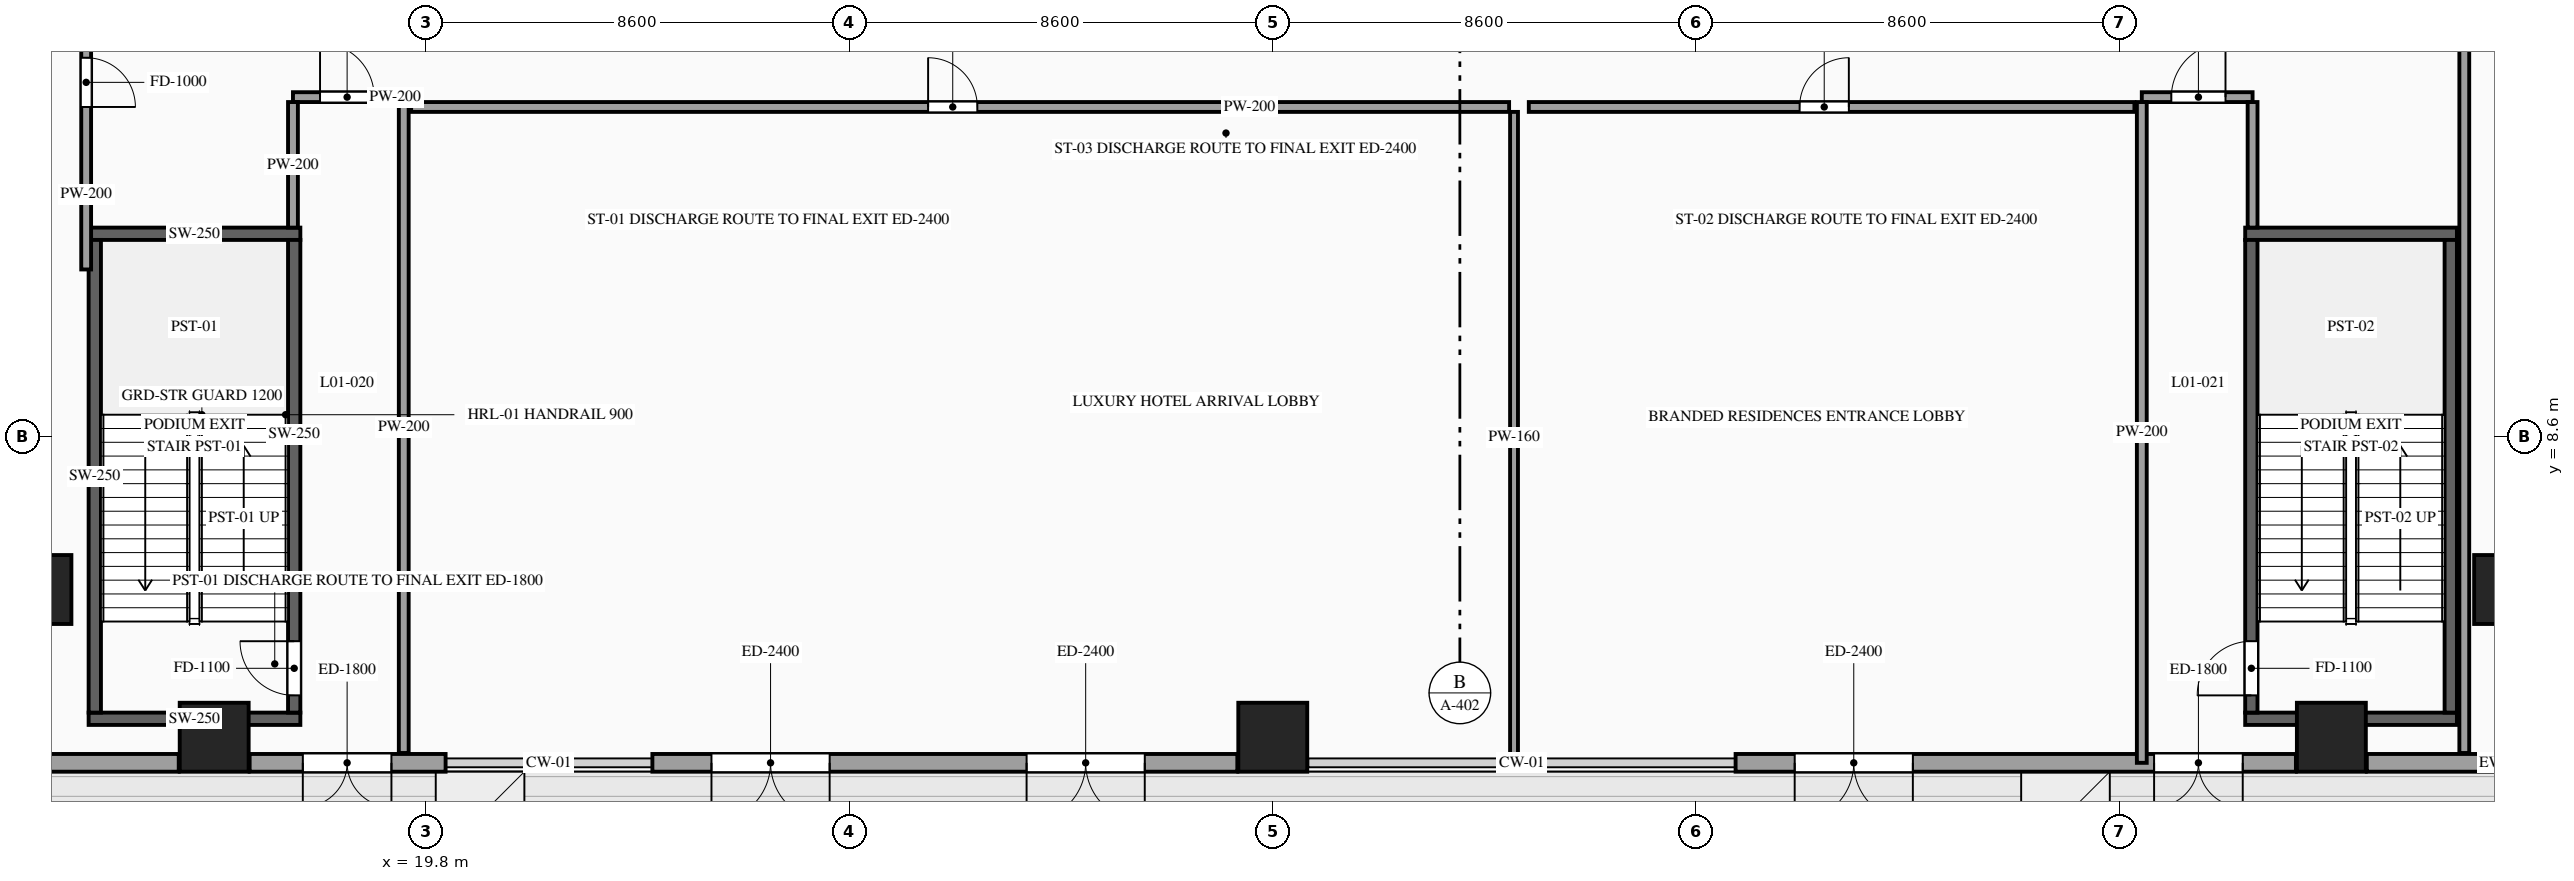
"""IFC4 building model, lengths in metres.
Left out: names, types, materials, properties, quantities, classifications, styles, units other than length and angle.
Written with IfcOpenShell. Run it as: python <this file> out.ifc"""

import sys

from ifc_helpers import new_model, si_unit, direction, frame, frame_2d, origin, origin_2d, place, context, subcontext, project, spatial, rectangle, extrude, source, transform, mapped, element, fill, save


model = new_model("IFC4")
c1 = context("Model", 3, precision=1e-05, world=origin(), true_north=direction((0.0, 1.0)))
c2 = subcontext(c1, "Body", "Model", "MODEL_VIEW")
j1 = project(units=[si_unit("LENGTHUNIT", "METRE"), si_unit("PLANEANGLEUNIT", "RADIAN")], contexts=[c1])
p1 = place(None, origin())
s1 = spatial("IfcSite", under=j1, at=p1, CompositionType="ELEMENT")
p2 = place(p1, origin())
s2 = spatial("IfcBuilding", under=s1, at=p2, CompositionType="ELEMENT")
p3 = place(p2, origin())
s3 = spatial("IfcBuildingStorey", under=s2, at=p3, CompositionType="ELEMENT", Elevation=0.0)
m1 = source(origin(), c2, "Body", "SweptSolid", [
    extrude(rectangle(XDim=1.4, YDim=1.4, at=origin_2d()), origin(), (0.0, 0.0, 1.0), 5.4),
])
for number, where, z_axis, x_axis in (
    (1, (11.9, 5.5, 0.0), (0.0, 0.0, 1.0), (1.0, 0.0, 0.0)),
    (2, (62.1, 5.5, 0.0), (0.0, 0.0, 1.0), (1.0, 0.0, 0.0)),
    (3, (15.5, 2.5, 0.0), (0.0, 0.0, 1.0), (1.0, 0.0, 0.0)),
    (4, (37.0, 2.5, 0.0), (0.0, 0.0, 1.0), (1.0, 0.0, 0.0)),
    (5, (58.5, 2.5, 0.0), (0.0, 0.0, 1.0), (1.0, 0.0, 0.0)),
):
    element("IfcColumn", number, at=place(p3, frame(where, z_axis=z_axis, x_axis=x_axis)), inside=s3, PredefinedType="COLUMN", context=c2, shape_type="MappedRepresentation", body=[
        mapped(m1, transform((0.0, 0.0, 0.0), scale=1.0)),
    ])
p4 = place(p3, frame((14.78, 1.98, 0.0), z_axis=(0.0, 0.0, 1.0), x_axis=(-1.0, 0.0, 0.0)))
e6 = element("IfcWall", 6, at=p4, inside=s3, PredefinedType="SOLIDWALL", context=c2, shape_type="SweptSolid", body=[
    extrude(rectangle(XDim=12.78, YDim=0.36, at=frame_2d((6.39, 0.0))), origin(), (0.0, 0.0, 1.0), 5.12),
])
p5 = place(p4, frame((6.68, 0.0, 0.0)))
e7 = element("IfcOpeningElement", 7, at=p5, cuts=e6, PredefinedType="OPENING", context=c2, shape_type="SweptSolid", body=[
    extrude(rectangle(XDim=1.0, YDim=2.2, at=frame_2d((0.5, 1.1))), frame((0.0, 0.195, 0.0), z_axis=(0.0, -1.0, 0.0), x_axis=(1.0, 0.0, 0.0)), (0.0, 0.0, 1.0), 0.39),
])
p6 = place(p3, frame((72.0, 1.98, 0.0), z_axis=(0.0, 0.0, 1.0), x_axis=(-1.0, 0.0, 0.0)))
e8 = element("IfcWall", 8, at=p6, inside=s3, PredefinedType="SOLIDWALL", context=c2, shape_type="SweptSolid", body=[
    extrude(rectangle(XDim=12.78, YDim=0.36, at=frame_2d((6.39, 0.0))), origin(), (0.0, 0.0, 1.0), 5.12),
])
p7 = place(p6, frame((5.1, 0.0, 0.0)))
e9 = element("IfcOpeningElement", 9, at=p7, cuts=e8, PredefinedType="OPENING", context=c2, shape_type="SweptSolid", body=[
    extrude(rectangle(XDim=1.8, YDim=2.4, at=frame_2d((0.9, 1.2))), frame((0.0, 0.195, 0.0), z_axis=(0.0, -1.0, 0.0), x_axis=(1.0, 0.0, 0.0)), (0.0, 0.0, 1.0), 0.39),
])
p8 = place(p3, frame((20.2, 1.98, 0.0), z_axis=(0.0, 0.0, 1.0), x_axis=(-1.0, 0.0, 0.0)))
e10 = element("IfcWall", 10, at=p8, inside=s3, PredefinedType="SOLIDWALL", context=c2, shape_type="SweptSolid", body=[
    extrude(rectangle(XDim=3.98, YDim=0.36, at=frame_2d((1.99, 0.0))), origin(), (0.0, 0.0, 1.0), 5.12),
])
p9 = place(p8, frame((1.1, 0.0, 0.0)))
e11 = element("IfcOpeningElement", 11, at=p9, cuts=e10, PredefinedType="OPENING", context=c2, shape_type="SweptSolid", body=[
    extrude(rectangle(XDim=1.8, YDim=2.4, at=frame_2d((0.9, 1.2))), frame((0.0, 0.195, 0.0), z_axis=(0.0, -1.0, 0.0), x_axis=(1.0, 0.0, 0.0)), (0.0, 0.0, 1.0), 0.39),
])
p10 = place(p3, frame((36.28, 1.98, 0.0), z_axis=(0.0, 0.0, 1.0), x_axis=(-1.0, 0.0, 0.0)))
e12 = element("IfcWall", 12, at=p10, inside=s3, PredefinedType="SOLIDWALL", context=c2, shape_type="SweptSolid", body=[
    extrude(rectangle(XDim=11.88, YDim=0.36, at=frame_2d((5.94, 0.0))), origin(), (0.0, 0.0, 1.0), 5.12),
])
p11 = place(p10, frame((8.28, 0.0, 0.0)))
e13 = element("IfcOpeningElement", 13, at=p11, cuts=e12, PredefinedType="OPENING", context=c2, shape_type="SweptSolid", body=[
    extrude(rectangle(XDim=2.4, YDim=2.8, at=frame_2d((1.2, 1.4))), frame((0.0, 0.195, 0.0), z_axis=(0.0, -1.0, 0.0), x_axis=(1.0, 0.0, 0.0)), (0.0, 0.0, 1.0), 0.39),
])
p12 = place(p10, frame((1.88, 0.0, 0.0)))
e14 = element("IfcOpeningElement", 14, at=p12, cuts=e12, PredefinedType="OPENING", context=c2, shape_type="SweptSolid", body=[
    extrude(rectangle(XDim=2.4, YDim=2.8, at=frame_2d((1.2, 1.4))), frame((0.0, 0.195, 0.0), z_axis=(0.0, -1.0, 0.0), x_axis=(1.0, 0.0, 0.0)), (0.0, 0.0, 1.0), 0.39),
])
p13 = place(p3, frame((57.78, 1.98, 0.0), z_axis=(0.0, 0.0, 1.0), x_axis=(-1.0, 0.0, 0.0)))
e15 = element("IfcWall", 15, at=p13, inside=s3, PredefinedType="SOLIDWALL", context=c2, shape_type="SweptSolid", body=[
    extrude(rectangle(XDim=11.38, YDim=0.36, at=frame_2d((5.69, 0.0))), origin(), (0.0, 0.0, 1.0), 5.12),
])
p14 = place(p13, frame((7.78, 0.0, 0.0)))
e16 = element("IfcOpeningElement", 16, at=p14, cuts=e15, PredefinedType="OPENING", context=c2, shape_type="SweptSolid", body=[
    extrude(rectangle(XDim=2.4, YDim=2.8, at=frame_2d((1.2, 1.4))), frame((0.0, 0.195, 0.0), z_axis=(0.0, -1.0, 0.0), x_axis=(1.0, 0.0, 0.0)), (0.0, 0.0, 1.0), 0.39),
])
p15 = place(p13, frame((1.08, 0.0, 0.0)))
e17 = element("IfcOpeningElement", 17, at=p15, cuts=e15, PredefinedType="OPENING", context=c2, shape_type="SweptSolid", body=[
    extrude(rectangle(XDim=1.8, YDim=2.4, at=frame_2d((0.9, 1.2))), frame((0.0, 0.195, 0.0), z_axis=(0.0, -1.0, 0.0), x_axis=(1.0, 0.0, 0.0)), (0.0, 0.0, 1.0), 0.39),
])
m2 = source(origin(), c2, "Body", "SweptSolid", [
    extrude(rectangle(XDim=4.3, YDim=0.25, at=frame_2d((2.15, 0.0))), origin(), (0.0, 0.0, 1.0), 5.12),
])
for number, where, z_axis, x_axis in (
    (18, (12.95, 2.875, 0.0), (0.0, 0.0, 1.0), (1.0, 0.0, 0.0)),
    (19, (12.95, 12.725, 0.0), (0.0, 0.0, 1.0), (1.0, 0.0, 0.0)),
):
    element("IfcWall", number, at=place(p3, frame(where, z_axis=z_axis, x_axis=x_axis)), inside=s3, PredefinedType="SOLIDWALL", context=c2, shape_type="MappedRepresentation", body=[
        mapped(m2, transform((0.0, 0.0, 0.0), scale=1.0)),
    ])
m3 = source(origin(), c2, "Body", "SweptSolid", [
    extrude(rectangle(XDim=9.6, YDim=0.25, at=frame_2d((4.8, 0.0))), origin(), (0.0, 0.0, 1.0), 5.12),
])
p16 = place(p3, frame((13.075, 3.0, 0.0), z_axis=(0.0, 0.0, 1.0), x_axis=(0.0, 1.0, 0.0)))
e20 = element("IfcWall", 20, at=p16, inside=s3, PredefinedType="SOLIDWALL", context=c2, shape_type="MappedRepresentation", body=[
    mapped(m3, transform((0.0, 0.0, 0.0), scale=1.0)),
])
p17 = place(p3, frame((17.125, 3.0, 0.0), z_axis=(0.0, 0.0, 1.0), x_axis=(0.0, 1.0, 0.0)))
e21 = element("IfcWall", 21, at=p17, inside=s3, PredefinedType="SOLIDWALL", context=c2, shape_type="SweptSolid", body=[
    extrude(rectangle(XDim=9.6, YDim=0.25, at=frame_2d((4.8, 0.0))), origin(), (0.0, 0.0, 1.0), 5.12),
])
p18 = place(p17, frame((0.35, 0.0, 0.0)))
e22 = element("IfcOpeningElement", 22, at=p18, cuts=e21, PredefinedType="OPENING", context=c2, shape_type="SweptSolid", body=[
    extrude(rectangle(XDim=1.1, YDim=2.2, at=frame_2d((0.55, 1.1))), frame((0.0, 0.14, 0.0), z_axis=(0.0, -1.0, 0.0), x_axis=(1.0, 0.0, 0.0)), (0.0, 0.0, 1.0), 0.28),
])
for number, where, z_axis, x_axis in (
    (23, (56.75, 2.875, 0.0), (0.0, 0.0, 1.0), (1.0, 0.0, 0.0)),
    (24, (56.75, 12.725, 0.0), (0.0, 0.0, 1.0), (1.0, 0.0, 0.0)),
):
    element("IfcWall", number, at=place(p3, frame(where, z_axis=z_axis, x_axis=x_axis)), inside=s3, PredefinedType="SOLIDWALL", context=c2, shape_type="MappedRepresentation", body=[
        mapped(m2, transform((0.0, 0.0, 0.0), scale=1.0)),
    ])
p19 = place(p3, frame((56.875, 3.0, 0.0), z_axis=(0.0, 0.0, 1.0), x_axis=(0.0, 1.0, 0.0)))
e25 = element("IfcWall", 25, at=p19, inside=s3, PredefinedType="SOLIDWALL", context=c2, shape_type="SweptSolid", body=[
    extrude(rectangle(XDim=9.6, YDim=0.25, at=frame_2d((4.8, 0.0))), origin(), (0.0, 0.0, 1.0), 5.12),
])
p20 = place(p19, frame((0.35, 0.0, 0.0)))
e26 = element("IfcOpeningElement", 26, at=p20, cuts=e25, PredefinedType="OPENING", context=c2, shape_type="SweptSolid", body=[
    extrude(rectangle(XDim=1.1, YDim=2.2, at=frame_2d((0.55, 1.1))), frame((0.0, 0.14, 0.0), z_axis=(0.0, -1.0, 0.0), x_axis=(1.0, 0.0, 0.0)), (0.0, 0.0, 1.0), 0.28),
])
p21 = place(p3, frame((60.925, 3.0, 0.0), z_axis=(0.0, 0.0, 1.0), x_axis=(0.0, 1.0, 0.0)))
e27 = element("IfcWall", 27, at=p21, inside=s3, PredefinedType="SOLIDWALL", context=c2, shape_type="MappedRepresentation", body=[
    mapped(m3, transform((0.0, 0.0, 0.0), scale=1.0)),
])
p22 = place(p3, frame((17.1, 15.5, 0.0), z_axis=(0.0, 0.0, 1.0), x_axis=(1.0, 0.0, 0.0)))
e28 = element("IfcWall", 28, at=p22, inside=s3, PredefinedType="PARTITIONING", context=c2, shape_type="SweptSolid", body=[
    extrude(rectangle(XDim=2.25, YDim=0.2, at=frame_2d((1.125, 0.0))), origin(), (0.0, 0.0, 1.0), 5.12),
])
p23 = place(p22, frame((0.55, 0.0, 0.0)))
e29 = element("IfcOpeningElement", 29, at=p23, cuts=e28, PredefinedType="OPENING", context=c2, shape_type="SweptSolid", body=[
    extrude(rectangle(XDim=1.1, YDim=2.2, at=frame_2d((0.55, 1.1))), frame((0.0, 0.115, 0.0), z_axis=(0.0, -1.0, 0.0), x_axis=(1.0, 0.0, 0.0)), (0.0, 0.0, 1.0), 0.23),
])
m4 = source(origin(), c2, "Body", "SweptSolid", [
    extrude(rectangle(XDim=13.22, YDim=0.2, at=frame_2d((6.61, 0.0))), origin(), (0.0, 0.0, 1.0), 5.12),
])
p24 = place(p3, frame((19.35, 2.18, 0.0), z_axis=(0.0, 0.0, 1.0), x_axis=(0.0, 1.0, 0.0)))
e30 = element("IfcWall", 30, at=p24, inside=s3, PredefinedType="PARTITIONING", context=c2, shape_type="MappedRepresentation", body=[
    mapped(m4, transform((0.0, 0.0, 0.0), scale=1.0)),
])
m5 = source(origin(), c2, "Body", "SweptSolid", [
    extrude(rectangle(XDim=2.55, YDim=0.2, at=frame_2d((1.275, 0.0))), origin(), (0.0, 0.0, 1.0), 5.12),
])
p25 = place(p3, frame((17.1, 12.85, 0.0), z_axis=(0.0, 0.0, 1.0), x_axis=(0.0, 1.0, 0.0)))
e31 = element("IfcWall", 31, at=p25, inside=s3, PredefinedType="PARTITIONING", context=c2, shape_type="MappedRepresentation", body=[
    mapped(m5, transform((0.0, 0.0, 0.0), scale=1.0)),
])
p26 = place(p3, frame((54.65, 15.5, 0.0), z_axis=(0.0, 0.0, 1.0), x_axis=(1.0, 0.0, 0.0)))
e32 = element("IfcWall", 32, at=p26, inside=s3, PredefinedType="PARTITIONING", context=c2, shape_type="SweptSolid", body=[
    extrude(rectangle(XDim=2.25, YDim=0.2, at=frame_2d((1.125, 0.0))), origin(), (0.0, 0.0, 1.0), 5.12),
])
p27 = place(p26, frame((0.6, 0.0, 0.0)))
e33 = element("IfcOpeningElement", 33, at=p27, cuts=e32, PredefinedType="OPENING", context=c2, shape_type="SweptSolid", body=[
    extrude(rectangle(XDim=1.1, YDim=2.2, at=frame_2d((0.55, 1.1))), frame((0.0, 0.115, 0.0), z_axis=(0.0, -1.0, 0.0), x_axis=(1.0, 0.0, 0.0)), (0.0, 0.0, 1.0), 0.23),
])
m6 = source(origin(), c2, "Body", "SweptSolid", [
    extrude(rectangle(XDim=13.42, YDim=0.2, at=frame_2d((6.71, 0.0))), origin(), (0.0, 0.0, 1.0), 5.12),
])
p28 = place(p3, frame((54.65, 1.98, 0.0), z_axis=(0.0, 0.0, 1.0), x_axis=(0.0, 1.0, 0.0)))
e34 = element("IfcWall", 34, at=p28, inside=s3, PredefinedType="PARTITIONING", context=c2, shape_type="MappedRepresentation", body=[
    mapped(m6, transform((0.0, 0.0, 0.0), scale=1.0)),
])
p29 = place(p3, frame((56.9, 12.85, 0.0), z_axis=(0.0, 0.0, 1.0), x_axis=(0.0, 1.0, 0.0)))
e35 = element("IfcWall", 35, at=p29, inside=s3, PredefinedType="PARTITIONING", context=c2, shape_type="MappedRepresentation", body=[
    mapped(m5, transform((0.0, 0.0, 0.0), scale=1.0)),
])
p30 = place(p3, frame((12.9, 18.4, 0.0), z_axis=(0.0, 0.0, 1.0), x_axis=(0.0, -1.0, 0.0)))
e36 = element("IfcWall", 36, at=p30, inside=s3, PredefinedType="PARTITIONING", context=c2, shape_type="SweptSolid", body=[
    extrude(rectangle(XDim=6.4, YDim=0.2, at=frame_2d((3.2, 0.0))), origin(), (0.0, 0.0, 1.0), 5.12),
])
p31 = place(p30, frame((2.1, 0.0, 0.0)))
e37 = element("IfcOpeningElement", 37, at=p31, cuts=e36, PredefinedType="OPENING", context=c2, shape_type="SweptSolid", body=[
    extrude(rectangle(XDim=1.0, YDim=2.2, at=frame_2d((0.5, 1.1))), frame((0.0, 0.115, 0.0), z_axis=(0.0, -1.0, 0.0), x_axis=(1.0, 0.0, 0.0)), (0.0, 0.0, 1.0), 0.23),
])
p32 = place(p3, frame((19.5, 15.3, 0.0), z_axis=(0.0, 0.0, 1.0), x_axis=(1.0, 0.0, 0.0)))
e38 = element("IfcWall", 38, at=p32, inside=s3, PredefinedType="PARTITIONING", context=c2, shape_type="SweptSolid", body=[
    extrude(rectangle(XDim=22.3, YDim=0.2, at=frame_2d((11.15, 0.0))), origin(), (0.0, 0.0, 1.0), 5.12),
])
p33 = place(p32, frame((10.5, 0.0, 0.0)))
e39 = element("IfcOpeningElement", 39, at=p33, cuts=e38, PredefinedType="OPENING", context=c2, shape_type="SweptSolid", body=[
    extrude(rectangle(XDim=1.0, YDim=2.2, at=frame_2d((0.5, 1.1))), frame((0.0, 0.115, 0.0), z_axis=(0.0, -1.0, 0.0), x_axis=(1.0, 0.0, 0.0)), (0.0, 0.0, 1.0), 0.23),
])
m7 = source(origin(), c2, "Body", "SweptSolid", [
    extrude(rectangle(XDim=13.22, YDim=0.16, at=frame_2d((6.61, 0.0))), origin(), (0.0, 0.0, 1.0), 5.12),
])
p34 = place(p3, frame((41.9, 1.98, 0.0), z_axis=(0.0, 0.0, 1.0), x_axis=(0.0, 1.0, 0.0)))
e40 = element("IfcWall", 40, at=p34, inside=s3, PredefinedType="PARTITIONING", context=c2, shape_type="MappedRepresentation", body=[
    mapped(m7, transform((0.0, 0.0, 0.0), scale=1.0)),
])
p35 = place(p3, frame((42.2, 15.3, 0.0), z_axis=(0.0, 0.0, 1.0), x_axis=(1.0, 0.0, 0.0)))
e41 = element("IfcWall", 41, at=p35, inside=s3, PredefinedType="PARTITIONING", context=c2, shape_type="SweptSolid", body=[
    extrude(rectangle(XDim=12.3, YDim=0.2, at=frame_2d((6.15, 0.0))), origin(), (0.0, 0.0, 1.0), 5.12),
])
p36 = place(p35, frame((5.5, 0.0, 0.0)))
e42 = element("IfcOpeningElement", 42, at=p36, cuts=e41, PredefinedType="OPENING", context=c2, shape_type="SweptSolid", body=[
    extrude(rectangle(XDim=1.0, YDim=2.2, at=frame_2d((0.5, 1.1))), frame((0.0, 0.115, 0.0), z_axis=(0.0, -1.0, 0.0), x_axis=(1.0, 0.0, 0.0)), (0.0, 0.0, 1.0), 0.23),
])
p37 = place(p3, frame((61.2, 2.18, 0.0), z_axis=(0.0, 0.0, 1.0), x_axis=(0.0, 1.0, 0.0)))
e43 = element("IfcWall", 43, at=p37, inside=s3, PredefinedType="PARTITIONING", context=c2, shape_type="SweptSolid", body=[
    extrude(rectangle(XDim=22.22, YDim=0.2, at=frame_2d((11.11, 0.0))), origin(), (0.0, 0.0, 1.0), 5.12),
])
p38 = place(p37, frame((15.32, 0.0, 0.0)))
e44 = element("IfcOpeningElement", 44, at=p38, cuts=e43, PredefinedType="OPENING", context=c2, shape_type="SweptSolid", body=[
    extrude(rectangle(XDim=1.0, YDim=2.2, at=frame_2d((0.5, 1.1))), frame((0.0, 0.115, 0.0), z_axis=(0.0, -1.0, 0.0), x_axis=(1.0, 0.0, 0.0)), (0.0, 0.0, 1.0), 0.23),
])
m8 = source(origin(), c2, "Body", "SweptSolid", [
    extrude(rectangle(XDim=1.8, YDim=2.4, at=frame_2d((0.9, 1.2))), frame((0.0, 0.025, 0.0), z_axis=(0.0, -1.0, 0.0), x_axis=(1.0, 0.0, 0.0)), (0.0, 0.0, 1.0), 0.05),
])
p39 = place(p9, origin())
e45 = element("IfcDoor", 45, at=p39, inside=s3, OperationType="DOUBLE_DOOR_SINGLE_SWING", PredefinedType="DOOR", context=c2, shape_type="MappedRepresentation", body=[
    mapped(m8, transform((0.0, 0.0, 0.0), scale=1.0)),
])
fill(e11, e45)
m9 = source(origin(), c2, "Body", "SweptSolid", [
    extrude(rectangle(XDim=2.4, YDim=2.8, at=frame_2d((1.2, 1.4))), frame((0.0, 0.025, 0.0), z_axis=(0.0, -1.0, 0.0), x_axis=(1.0, 0.0, 0.0)), (0.0, 0.0, 1.0), 0.05),
])
p40 = place(p11, origin())
e46 = element("IfcDoor", 46, at=p40, inside=s3, OperationType="DOUBLE_DOOR_SINGLE_SWING", PredefinedType="DOOR", context=c2, shape_type="MappedRepresentation", body=[
    mapped(m9, transform((0.0, 0.0, 0.0), scale=1.0)),
])
fill(e13, e46)
p41 = place(p12, origin())
e47 = element("IfcDoor", 47, at=p41, inside=s3, OperationType="DOUBLE_DOOR_SINGLE_SWING", PredefinedType="DOOR", context=c2, shape_type="MappedRepresentation", body=[
    mapped(m9, transform((0.0, 0.0, 0.0), scale=1.0)),
])
fill(e14, e47)
p42 = place(p14, origin())
e48 = element("IfcDoor", 48, at=p42, inside=s3, OperationType="DOUBLE_DOOR_SINGLE_SWING", PredefinedType="DOOR", context=c2, shape_type="MappedRepresentation", body=[
    mapped(m9, transform((0.0, 0.0, 0.0), scale=1.0)),
])
fill(e16, e48)
p43 = place(p15, origin())
e49 = element("IfcDoor", 49, at=p43, inside=s3, OperationType="DOUBLE_DOOR_SINGLE_SWING", PredefinedType="DOOR", context=c2, shape_type="MappedRepresentation", body=[
    mapped(m8, transform((0.0, 0.0, 0.0), scale=1.0)),
])
fill(e17, e49)
m10 = source(origin(), c2, "Body", "SweptSolid", [
    extrude(rectangle(XDim=1.1, YDim=2.2, at=frame_2d((0.55, 1.1))), frame((0.0, 0.025, 0.0), z_axis=(0.0, -1.0, 0.0), x_axis=(1.0, 0.0, 0.0)), (0.0, 0.0, 1.0), 0.05),
])
p44 = place(p18, origin())
e50 = element("IfcDoor", 50, at=p44, inside=s3, OperationType="SINGLE_SWING_RIGHT", PredefinedType="DOOR", context=c2, shape_type="MappedRepresentation", body=[
    mapped(m10, transform((0.0, 0.0, 0.0), scale=1.0)),
])
fill(e22, e50)
p45 = place(p20, origin())
e51 = element("IfcDoor", 51, at=p45, inside=s3, OperationType="SINGLE_SWING_LEFT", PredefinedType="DOOR", context=c2, shape_type="MappedRepresentation", body=[
    mapped(m10, transform((0.0, 0.0, 0.0), scale=1.0)),
])
fill(e26, e51)
p46 = place(p23, origin())
e52 = element("IfcDoor", 52, at=p46, inside=s3, OperationType="SINGLE_SWING_LEFT", PredefinedType="DOOR", context=c2, shape_type="MappedRepresentation", body=[
    mapped(m10, transform((0.0, 0.0, 0.0), scale=1.0)),
])
fill(e29, e52)
p47 = place(p27, origin())
e53 = element("IfcDoor", 53, at=p47, inside=s3, OperationType="SINGLE_SWING_RIGHT", PredefinedType="DOOR", context=c2, shape_type="MappedRepresentation", body=[
    mapped(m10, transform((0.0, 0.0, 0.0), scale=1.0)),
])
fill(e33, e53)
m11 = source(origin(), c2, "Body", "SweptSolid", [
    extrude(rectangle(XDim=1.0, YDim=2.2, at=frame_2d((0.5, 1.1))), frame((0.0, 0.025, 0.0), z_axis=(0.0, -1.0, 0.0), x_axis=(1.0, 0.0, 0.0)), (0.0, 0.0, 1.0), 0.05),
])
p48 = place(p31, origin())
e54 = element("IfcDoor", 54, at=p48, inside=s3, OperationType="SINGLE_SWING_RIGHT", PredefinedType="DOOR", context=c2, shape_type="MappedRepresentation", body=[
    mapped(m11, transform((0.0, 0.0, 0.0), scale=1.0)),
])
fill(e37, e54)
p49 = place(p33, origin())
e55 = element("IfcDoor", 55, at=p49, inside=s3, OperationType="SINGLE_SWING_LEFT", PredefinedType="DOOR", context=c2, shape_type="MappedRepresentation", body=[
    mapped(m11, transform((0.0, 0.0, 0.0), scale=1.0)),
])
fill(e39, e55)
p50 = place(p36, origin())
e56 = element("IfcDoor", 56, at=p50, inside=s3, OperationType="SINGLE_SWING_RIGHT", PredefinedType="DOOR", context=c2, shape_type="MappedRepresentation", body=[
    mapped(m11, transform((0.0, 0.0, 0.0), scale=1.0)),
])
fill(e42, e56)
save(model, sys.argv[1])
